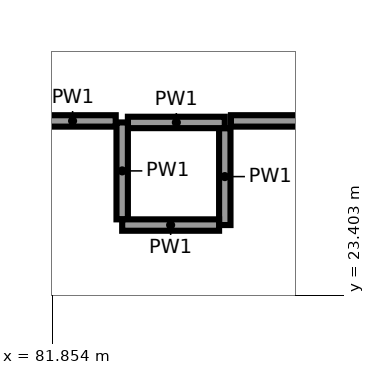
"""IFC4 building model, lengths in metres.
Left out: names, types, materials, properties, quantities, classifications, styles, units other than length and angle.
Written with IfcOpenShell. Run it as: python <this file> out.ifc"""

import sys

from ifc_helpers import new_model, si_unit, direction, frame, frame_2d, origin, place, context, subcontext, project, spatial, rectangle, extrude, element, save


model = new_model("IFC4")
c1 = context("Model", 3, precision=1e-05, world=origin(), true_north=direction((0.0, 1.0)))
c2 = subcontext(c1, "Body", "Model", "MODEL_VIEW")
j1 = project(units=[si_unit("LENGTHUNIT", "METRE"), si_unit("PLANEANGLEUNIT", "RADIAN")], contexts=[c1])
p1 = place(None, origin())
s1 = spatial("IfcSite", under=j1, at=p1, CompositionType="ELEMENT")
p2 = place(p1, origin())
s2 = spatial("IfcBuilding", under=s1, at=p2, CompositionType="ELEMENT")
p3 = place(p2, frame((0.0, 0.0, 6.5)))
s3 = spatial("IfcBuildingStorey", under=s2, at=p3, CompositionType="ELEMENT", Elevation=6.5)
p4 = place(p3, frame((84.125, 24.325, 0.0), z_axis=(0.0, 0.0, 1.0), x_axis=(0.0, 1.0, 0.0)))
e1 = element("IfcWall", 1, at=p4, inside=s3, PredefinedType="PARTITIONING", context=c2, shape_type="SweptSolid", body=[
    extrude(rectangle(XDim=1.275, YDim=0.15, at=frame_2d((0.638, 0.0))), origin(), (0.0, 0.0, 1.0), 5.15),
])
p5 = place(p3, frame((84.125, 25.675, 0.0), z_axis=(0.0, 0.0, 1.0), x_axis=(-1.0, 0.0, 0.0)))
e2 = element("IfcWall", 2, at=p5, inside=s3, PredefinedType="PARTITIONING", context=c2, shape_type="SweptSolid", body=[
    extrude(rectangle(XDim=1.275, YDim=0.15, at=frame_2d((0.637, 0.0))), origin(), (0.0, 0.0, 1.0), 5.15),
])
for number, where, z_axis, x_axis in (
    (3, (82.775, 25.675, 0.0), (0.0, 0.0, 1.0), (0.0, -1.0, 0.0)),
    (4, (82.775, 24.325, 0.0), (0.0, 0.0, 1.0), (1.0, 0.0, 0.0)),
):
    element("IfcWall", number, at=place(p3, frame(where, z_axis=z_axis, x_axis=x_axis)), inside=s3, PredefinedType="PARTITIONING", context=c2, shape_type="SweptSolid", body=[
        extrude(rectangle(XDim=1.275, YDim=0.15, at=frame_2d((0.638, 0.0))), origin(), (0.0, 0.0, 1.0), 5.15),
    ])
p6 = place(p3, frame((87.909, 25.695, 0.0), z_axis=(0.0, 0.0, 1.0), x_axis=(-0.999999997827, -6.5919578e-05, 0.0)))
e5 = element("IfcWall", 5, at=p6, inside=s3, PredefinedType="PARTITIONING", context=c2, shape_type="SweptSolid", body=[
    extrude(rectangle(XDim=3.704, YDim=0.15, at=frame_2d((1.852, 0.0))), origin(), (0.0, 0.0, 1.0), 4.05),
])
p7 = place(p6, frame((0.65, 0.0, 0.0)))
e6 = element("IfcOpeningElement", 6, at=p7, cuts=e5, PredefinedType="OPENING", context=c2, shape_type="SweptSolid", body=[
    extrude(rectangle(XDim=1.8, YDim=2.1, at=frame_2d((0.9, 1.05))), frame((0.0, 0.085, 0.0), z_axis=(0.0, -1.0, 0.0), x_axis=(1.0, 0.0, 0.0)), (0.0, 0.0, 1.0), 0.17),
])
p8 = place(p3, frame((82.69, 25.695, 0.0), z_axis=(0.0, 0.0, 1.0), x_axis=(-1.0, 0.0, 0.0)))
e7 = element("IfcWall", 7, at=p8, inside=s3, PredefinedType="PARTITIONING", context=c2, shape_type="SweptSolid", body=[
    extrude(rectangle(XDim=1.135, YDim=0.15, at=frame_2d((0.567, 0.0))), origin(), (0.0, 0.0, 1.0), 5.15),
])
save(model, sys.argv[1])
